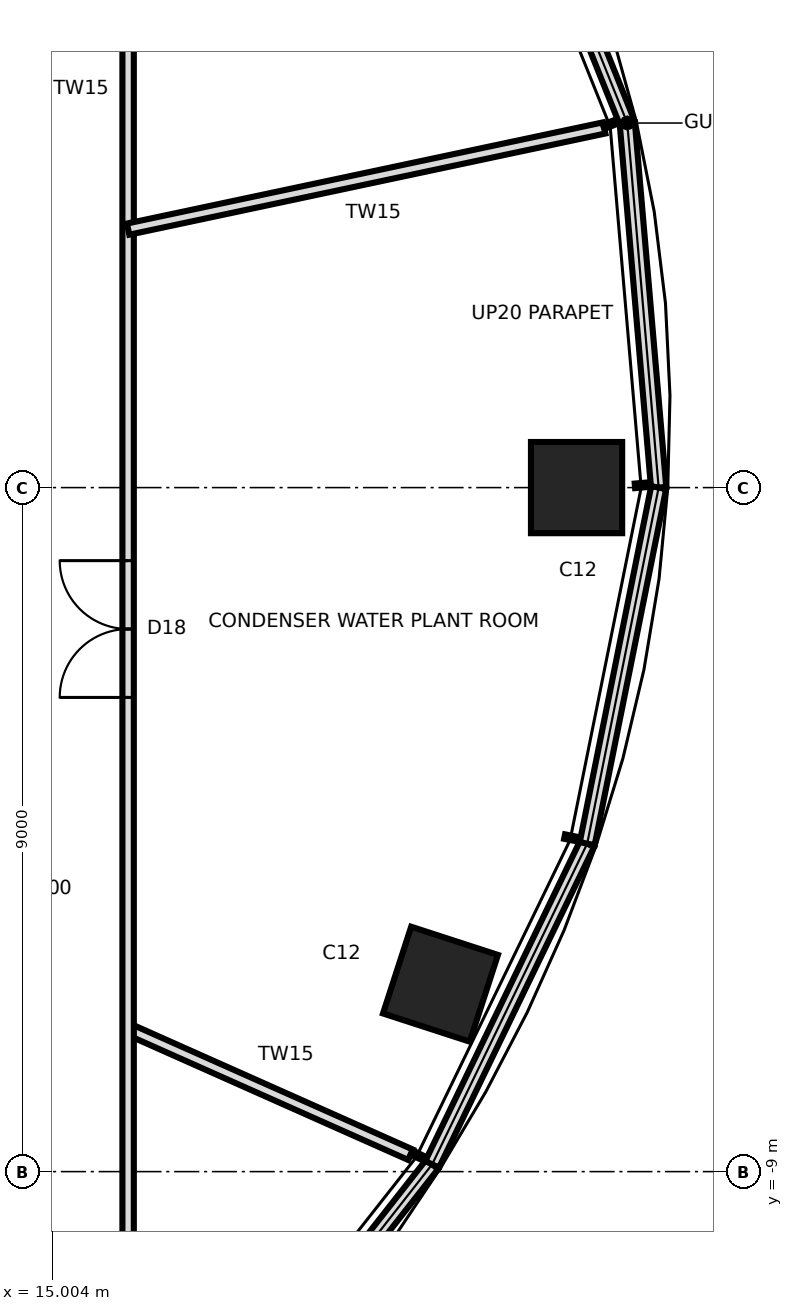
"""IFC4 building model, lengths in metres.
Left out: names, types, materials, properties, quantities, classifications, styles, units other than length and angle.
Written with IfcOpenShell. Run it as: python <this file> out.ifc"""

import sys

from ifc_helpers import new_model, si_unit, direction, frame, frame_2d, origin, origin_2d, place, context, subcontext, project, spatial, rectangle, extrude, element, fill, save


model = new_model("IFC4")
c1 = context("Model", 3, precision=1e-05, world=origin(), true_north=direction((0.0, 1.0)))
c2 = subcontext(c1, "Body", "Model", "MODEL_VIEW")
j1 = project(units=[si_unit("LENGTHUNIT", "METRE"), si_unit("PLANEANGLEUNIT", "RADIAN")], contexts=[c1])
p1 = place(None, origin())
s1 = spatial("IfcSite", under=j1, at=p1, CompositionType="ELEMENT")
p2 = place(p1, origin())
s2 = spatial("IfcBuilding", under=s1, at=p2, CompositionType="ELEMENT")
p3 = place(p2, frame((0.0, 0.0, 277.0)))
s3 = spatial("IfcBuildingStorey", under=s2, at=p3, CompositionType="ELEMENT", Elevation=277.0)
for number, where, z_axis, x_axis in (
    (1, (21.9, 0.0, 0.0), (0.0, 0.0, 1.0), (1.0, 0.0, 0.0)),
    (2, (20.109, -6.534, 0.0), (0.0, 0.0, 1.0), (0.951, -0.309, 0.0)),
):
    element("IfcColumn", number, at=place(p3, frame(where, z_axis=z_axis, x_axis=x_axis)), inside=s3, PredefinedType="COLUMN", context=c2, shape_type="SweptSolid", body=[
        extrude(rectangle(XDim=1.2, YDim=1.2, at=origin_2d()), origin(), (0.0, 0.0, 1.0), 5.0),
    ])
p4 = place(p3, frame((22.98, 0.0, 5.0), z_axis=(0.0, 0.0, 1.0), x_axis=(-0.085747752545, 0.996316878776, 0.0)))
e3 = element("IfcWall", 3, at=p4, inside=s3, PredefinedType="PARAPET", context=c2, shape_type="SweptSolid", body=[
    extrude(rectangle(XDim=4.815, YDim=0.2, at=frame_2d((2.407, 0.0))), origin(), (0.0, 0.0, 1.0), 0.4),
])
p5 = place(p3, frame((22.567, 4.797, 5.0), z_axis=(0.0, 0.0, 1.0), x_axis=(-0.372363873994, 0.928086819939, 0.0)))
e4 = element("IfcWall", 4, at=p5, inside=s3, PredefinedType="PARAPET", context=c2, shape_type="SweptSolid", body=[
    extrude(rectangle(XDim=4.8, YDim=0.2, at=frame_2d((2.4, 0.0))), origin(), (0.0, 0.0, 1.0), 0.4),
])
p6 = place(p3, frame((17.189, -12.489, 5.0), z_axis=(0.0, 0.0, 1.0), x_axis=(0.617115858167, 0.786872300694, 0.0)))
e5 = element("IfcWall", 5, at=p6, inside=s3, PredefinedType="PARAPET", context=c2, shape_type="SweptSolid", body=[
    extrude(rectangle(XDim=4.555, YDim=0.2, at=frame_2d((2.277, 0.0))), origin(), (0.0, 0.0, 1.0), 0.4),
])
p7 = place(p3, frame((20.0, -8.905, 5.0), z_axis=(0.0, 0.0, 1.0), x_axis=(0.43525592316, 0.900306770692, 0.0)))
e6 = element("IfcWall", 6, at=p7, inside=s3, PredefinedType="PARAPET", context=c2, shape_type="SweptSolid", body=[
    extrude(rectangle(XDim=4.687, YDim=0.2, at=frame_2d((2.344, 0.0))), origin(), (0.0, 0.0, 1.0), 0.4),
])
p8 = place(p3, frame((22.04, -4.685, 5.0), z_axis=(0.0, 0.0, 1.0), x_axis=(0.196715481336, 0.980460615937, 0.0)))
e7 = element("IfcWall", 7, at=p8, inside=s3, PredefinedType="PARAPET", context=c2, shape_type="SweptSolid", body=[
    extrude(rectangle(XDim=4.778, YDim=0.2, at=frame_2d((2.389, 0.0))), origin(), (0.0, 0.0, 1.0), 0.4),
])
p9 = place(p3, frame((16.0, -7.124, 0.0), z_axis=(0.0, 0.0, 1.0), x_axis=(0.91357135451, -0.406678472774, 0.0)))
e8 = element("IfcWall", 8, at=p9, inside=s3, PredefinedType="PARTITIONING", context=c2, shape_type="SweptSolid", body=[
    extrude(rectangle(XDim=4.068, YDim=0.15, at=frame_2d((2.034, 0.0))), origin(), (0.0, 0.0, 1.0), 4.75),
])
p10 = place(p3, frame((16.0, -11.3, 0.0), z_axis=(0.0, 0.0, 1.0), x_axis=(0.0, 1.0, 0.0)))
e9 = element("IfcWall", 9, at=p10, inside=s3, PredefinedType="PARTITIONING", context=c2, shape_type="SweptSolid", body=[
    extrude(rectangle(XDim=22.6, YDim=0.15, at=frame_2d((11.3, 0.0))), origin(), (0.0, 0.0, 1.0), 4.75),
])
p11 = place(p10, frame((8.539, 0.0, 0.0)))
e10 = element("IfcOpeningElement", 10, at=p11, cuts=e9, PredefinedType="OPENING", context=c2, shape_type="SweptSolid", body=[
    extrude(rectangle(XDim=1.8, YDim=2.4, at=frame_2d((0.9, 1.2))), frame((0.0, 0.085, 0.0), z_axis=(0.0, -1.0, 0.0), x_axis=(1.0, 0.0, 0.0)), (0.0, 0.0, 1.0), 0.17),
])
p12 = place(p3, frame((22.264, 4.732, 0.0), z_axis=(0.0, 0.0, 1.0), x_axis=(-0.97814421791, -0.207927605117, 0.0)))
e11 = element("IfcWall", 11, at=p12, inside=s3, PredefinedType="PARTITIONING", context=c2, shape_type="SweptSolid", body=[
    extrude(rectangle(XDim=6.404, YDim=0.15, at=frame_2d((3.202, 0.0))), origin(), (0.0, 0.0, 1.0), 4.75),
])
p13 = place(p11, origin())
e12 = element("IfcDoor", 12, at=p13, inside=s3, OperationType="DOUBLE_DOOR_SINGLE_SWING", PredefinedType="DOOR", context=c2, shape_type="SweptSolid", body=[
    extrude(rectangle(XDim=1.8, YDim=2.4, at=frame_2d((0.9, 1.2))), frame((0.0, 0.025, 0.0), z_axis=(0.0, -1.0, 0.0), x_axis=(1.0, 0.0, 0.0)), (0.0, 0.0, 1.0), 0.05),
])
fill(e10, e12)
save(model, sys.argv[1])
